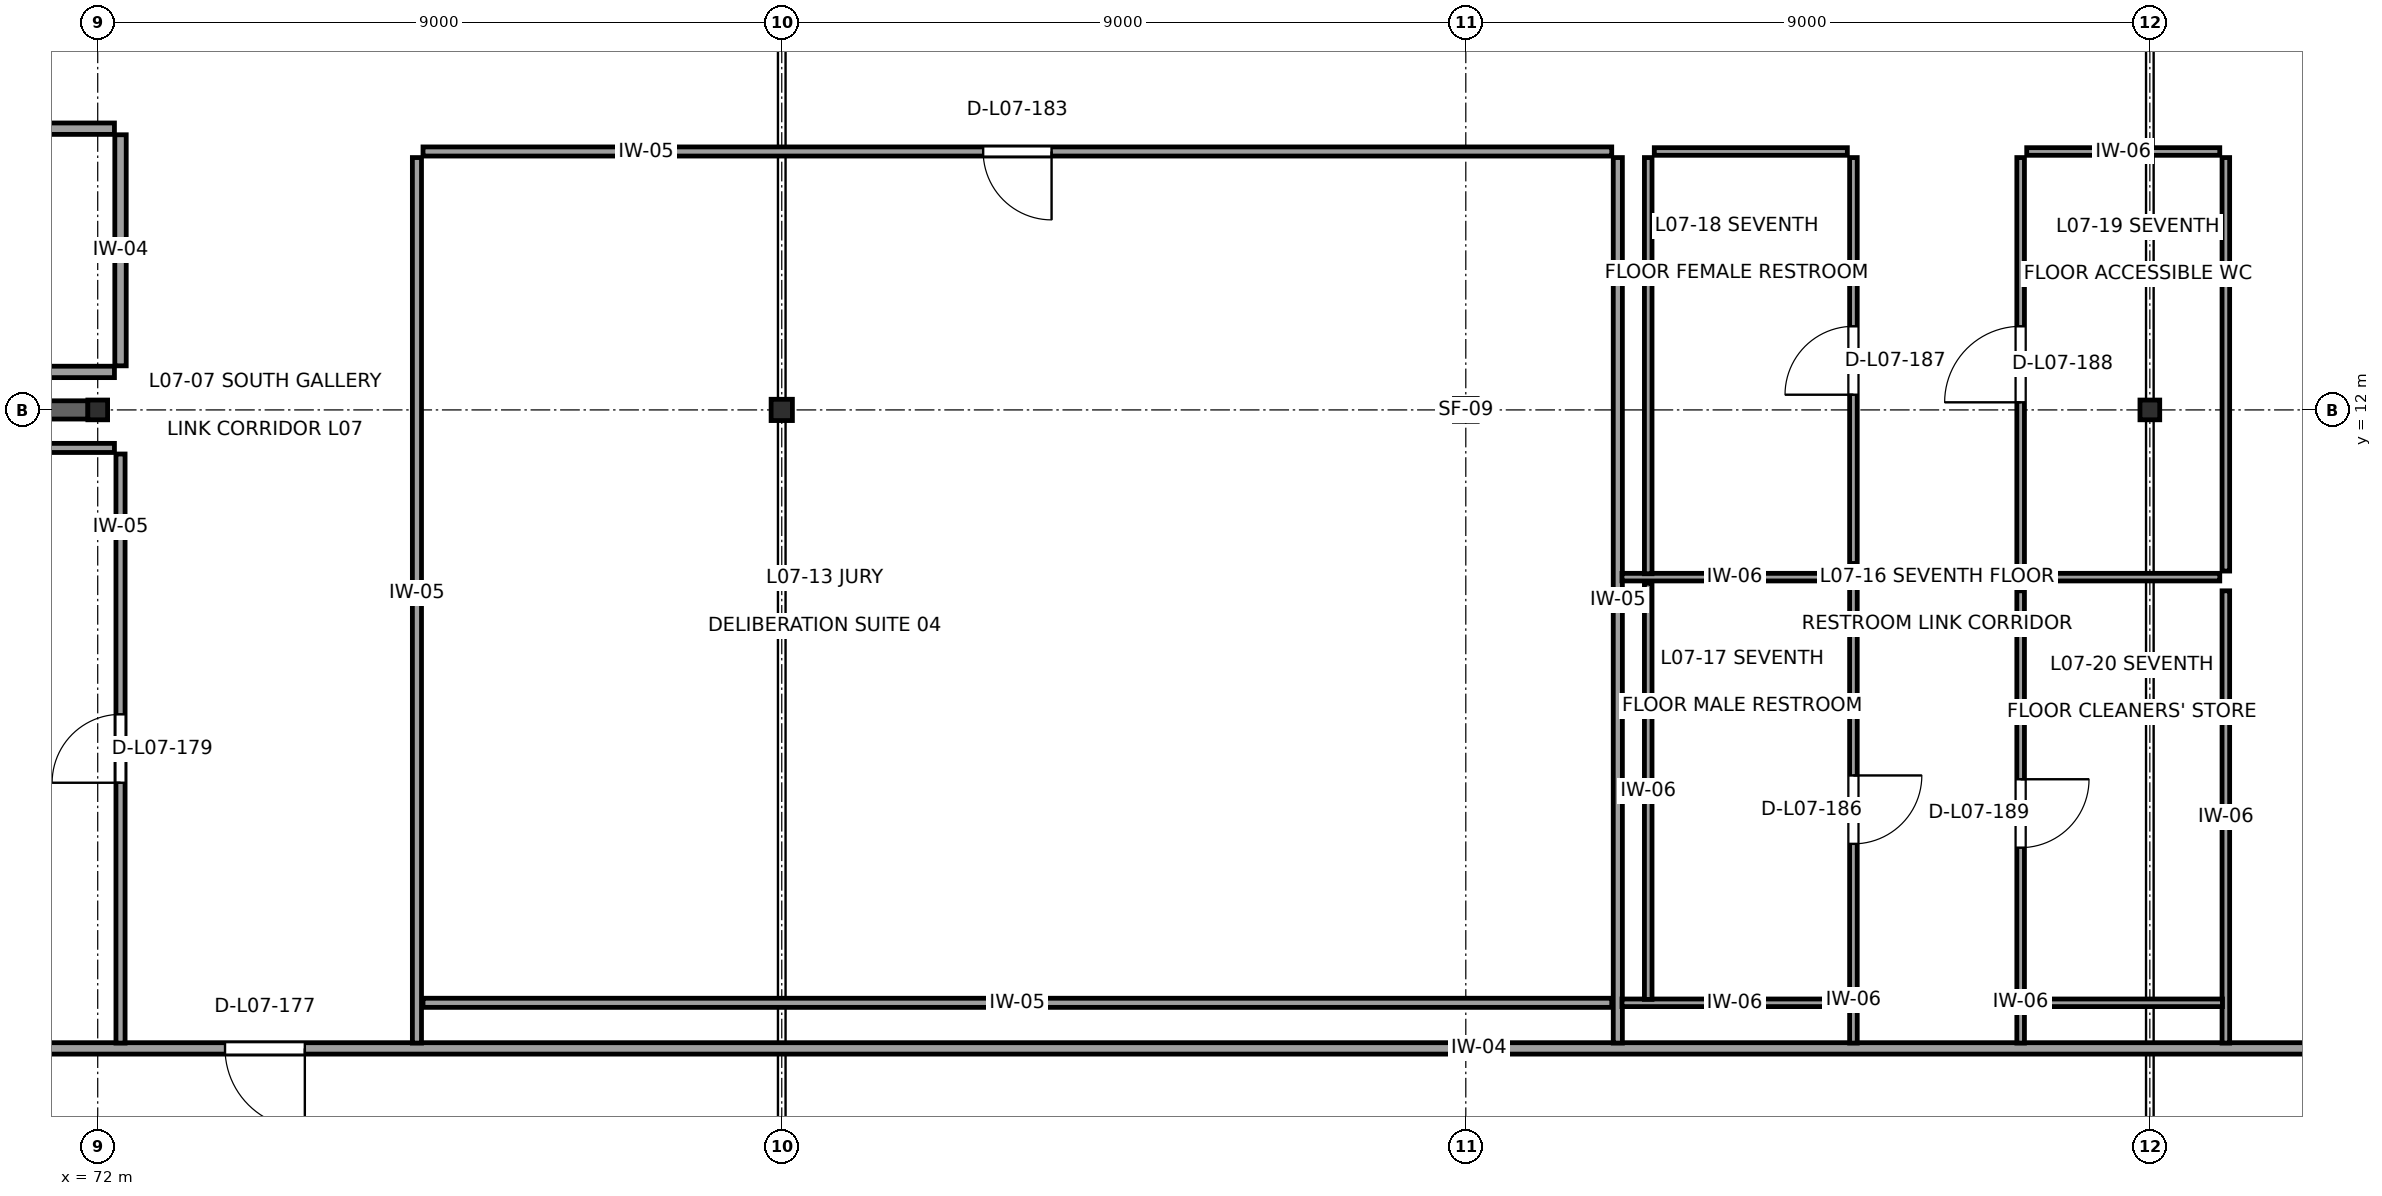
"""IFC4 building model, lengths in metres.
Left out: names, types, materials, properties, quantities, classifications, styles, units other than length and angle.
Written with IfcOpenShell. Run it as: python <this file> out.ifc"""

import sys

from ifc_helpers import new_model, si_unit, direction, frame, frame_2d, origin, origin_2d, place, context, subcontext, project, spatial, rectangle, i_section, extrude, element, fill, save


model = new_model("IFC4")
c1 = context("Model", 3, precision=1e-05, world=origin(), true_north=direction((0.0, 1.0)))
c2 = subcontext(c1, "Body", "Model", "MODEL_VIEW")
j1 = project(units=[si_unit("LENGTHUNIT", "METRE"), si_unit("PLANEANGLEUNIT", "RADIAN")], contexts=[c1])
p1 = place(None, origin())
s1 = spatial("IfcSite", under=j1, at=p1, CompositionType="ELEMENT")
p2 = place(p1, origin())
s2 = spatial("IfcBuilding", under=s1, at=p2, CompositionType="ELEMENT")
p3 = place(p2, frame((0.0, 0.0, 31.4)))
s3 = spatial("IfcBuildingStorey", under=s2, at=p3, CompositionType="ELEMENT", Elevation=31.4)
p4 = place(p3, frame((72.0, 12.0, 0.0), z_axis=(0.0, 0.0, 1.0), x_axis=(0.0, 1.0, 0.0)))
e1 = element("IfcColumn", 1, at=p4, inside=s3, PredefinedType="COLUMN", context=c2, shape_type="SweptSolid", body=[
    extrude(i_section(OverallWidth=0.26, OverallDepth=0.26, WebThickness=0.01, FlangeThickness=0.018, at=origin_2d()), origin(), (0.0, 0.0, 1.0), 4.0),
])
p5 = place(p3, frame((81.0, 12.0, 0.0), z_axis=(0.0, 0.0, 1.0), x_axis=(1.0, 0.0, 0.0)))
e2 = element("IfcColumn", 2, at=p5, inside=s3, PredefinedType="COLUMN", context=c2, shape_type="SweptSolid", body=[
    extrude(i_section(OverallWidth=0.28, OverallDepth=0.28, WebThickness=0.01, FlangeThickness=0.018, at=origin_2d()), origin(), (0.0, 0.0, 1.0), 4.0),
])
p6 = place(p3, frame((90.0, 12.0, 0.0), z_axis=(0.0, 0.0, 1.0), x_axis=(1.0, 0.0, 0.0)))
e3 = element("IfcColumn", 3, at=p6, inside=s3, PredefinedType="COLUMN", context=c2, shape_type="SweptSolid", body=[
    extrude(i_section(OverallWidth=0.3, OverallDepth=0.3, WebThickness=0.011, FlangeThickness=0.019, at=origin_2d()), origin(), (0.0, 0.0, 1.0), 4.0),
])
p7 = place(p3, frame((99.0, 12.0, 0.0), z_axis=(0.0, 0.0, 1.0), x_axis=(1.0, 0.0, 0.0)))
e4 = element("IfcColumn", 4, at=p7, inside=s3, PredefinedType="COLUMN", context=c2, shape_type="SweptSolid", body=[
    extrude(i_section(OverallWidth=0.26, OverallDepth=0.26, WebThickness=0.01, FlangeThickness=0.018, at=origin_2d()), origin(), (0.0, 0.0, 1.0), 4.0),
])
p8 = place(p3, frame((63.008, 12.0, 0.0), z_axis=(0.0, 0.0, 1.0), x_axis=(1.0, 0.0, 0.0)))
e5 = element("IfcWall", 5, at=p8, inside=s3, PredefinedType="SHEAR", context=c2, shape_type="SweptSolid", body=[
    extrude(rectangle(XDim=8.864, YDim=0.24, at=frame_2d((4.432, 0.0))), origin(), (0.0, 0.0, 1.0), 3.305),
])
p9 = place(p3, frame((45.88, 3.6, 0.0), z_axis=(0.0, 0.0, 1.0), x_axis=(1.0, 0.0, 0.0)))
e6 = element("IfcWall", 6, at=p9, inside=s3, PredefinedType="PARTITIONING", context=c2, shape_type="SweptSolid", body=[
    extrude(rectangle(XDim=58.24, YDim=0.15, at=frame_2d((29.12, 0.0))), origin(), (0.0, 0.0, 1.0), 3.64),
])
p10 = place(p9, frame((27.795, 0.0, 0.0)))
e7 = element("IfcOpeningElement", 7, at=p10, cuts=e6, PredefinedType="OPENING", context=c2, shape_type="SweptSolid", body=[
    extrude(rectangle(XDim=1.05, YDim=2.25, at=frame_2d((0.525, 1.125))), frame((0.0, 0.09, 0.0), z_axis=(0.0, -1.0, 0.0), x_axis=(1.0, 0.0, 0.0)), (0.0, 0.0, 1.0), 0.18),
])
p11 = place(p3, frame((62.795, 11.5, 0.0), z_axis=(0.0, 0.0, 1.0), x_axis=(1.0, 0.0, 0.0)))
e8 = element("IfcWall", 8, at=p11, inside=s3, PredefinedType="PARTITIONING", context=c2, shape_type="SweptSolid", body=[
    extrude(rectangle(XDim=9.425, YDim=0.12, at=frame_2d((4.712, 0.0))), origin(), (0.0, 0.0, 1.0), 3.64),
])
p12 = place(p3, frame((72.3, 11.42, 0.0), z_axis=(0.0, 0.0, 1.0), x_axis=(0.0, -1.0, 0.0)))
e9 = element("IfcWall", 9, at=p12, inside=s3, PredefinedType="PARTITIONING", context=c2, shape_type="SweptSolid", body=[
    extrude(rectangle(XDim=7.75, YDim=0.12, at=frame_2d((3.875, 0.0))), origin(), (0.0, 0.0, 1.0), 3.64),
])
p13 = place(p12, frame((3.425, 0.0, 0.0)))
e10 = element("IfcOpeningElement", 10, at=p13, cuts=e9, PredefinedType="OPENING", context=c2, shape_type="SweptSolid", body=[
    extrude(rectangle(XDim=0.9, YDim=2.1, at=frame_2d((0.45, 1.05))), frame((0.0, 0.075, 0.0), z_axis=(0.0, -1.0, 0.0), x_axis=(1.0, 0.0, 0.0)), (0.0, 0.0, 1.0), 0.15),
])
p14 = place(p3, frame((62.795, 15.7, 0.0), z_axis=(0.0, 0.0, 1.0), x_axis=(1.0, 0.0, 0.0)))
e11 = element("IfcWall", 11, at=p14, inside=s3, PredefinedType="PARTITIONING", context=c2, shape_type="SweptSolid", body=[
    extrude(rectangle(XDim=9.425, YDim=0.15, at=frame_2d((4.712, 0.0))), origin(), (0.0, 0.0, 1.0), 3.64),
])
p15 = place(p14, frame((4.187, 0.0, 0.0)))
e12 = element("IfcOpeningElement", 12, at=p15, cuts=e11, PredefinedType="OPENING", context=c2, shape_type="SweptSolid", body=[
    extrude(rectangle(XDim=1.05, YDim=2.25, at=frame_2d((0.525, 1.125))), frame((0.0, 0.09, 0.0), z_axis=(0.0, -1.0, 0.0), x_axis=(1.0, 0.0, 0.0)), (0.0, 0.0, 1.0), 0.18),
])
p16 = place(p3, frame((72.3, 15.62, 0.0), z_axis=(0.0, 0.0, 1.0), x_axis=(0.0, -1.0, 0.0)))
e13 = element("IfcWall", 13, at=p16, inside=s3, PredefinedType="PARTITIONING", context=c2, shape_type="SweptSolid", body=[
    extrude(rectangle(XDim=3.04, YDim=0.15, at=frame_2d((1.52, 0.0))), origin(), (0.0, 0.0, 1.0), 3.64),
])
p17 = place(p3, frame((72.22, 12.5, 0.0), z_axis=(0.0, 0.0, 1.0), x_axis=(-1.0, 0.0, 0.0)))
e14 = element("IfcWall", 14, at=p17, inside=s3, PredefinedType="PARTITIONING", context=c2, shape_type="SweptSolid", body=[
    extrude(rectangle(XDim=9.425, YDim=0.15, at=frame_2d((4.712, 0.0))), origin(), (0.0, 0.0, 1.0), 3.64),
])
p18 = place(p3, frame((91.92, 4.2, 0.0), z_axis=(0.0, 0.0, 1.0), x_axis=(-1.0, 0.0, 0.0)))
e15 = element("IfcWall", 15, at=p18, inside=s3, PredefinedType="PARTITIONING", context=c2, shape_type="SweptSolid", body=[
    extrude(rectangle(XDim=15.64, YDim=0.12, at=frame_2d((7.82, 0.0))), origin(), (0.0, 0.0, 1.0), 3.64),
])
p19 = place(p3, frame((76.2, 3.67, 0.0), z_axis=(0.0, 0.0, 1.0), x_axis=(0.0, 1.0, 0.0)))
e16 = element("IfcWall", 16, at=p19, inside=s3, PredefinedType="PARTITIONING", context=c2, shape_type="SweptSolid", body=[
    extrude(rectangle(XDim=11.65, YDim=0.12, at=frame_2d((5.825, 0.0))), origin(), (0.0, 0.0, 1.0), 3.64),
])
p20 = place(p3, frame((76.28, 15.4, 0.0), z_axis=(0.0, 0.0, 1.0), x_axis=(1.0, 0.0, 0.0)))
e17 = element("IfcWall", 17, at=p20, inside=s3, PredefinedType="PARTITIONING", context=c2, shape_type="SweptSolid", body=[
    extrude(rectangle(XDim=15.64, YDim=0.12, at=frame_2d((7.82, 0.0))), origin(), (0.0, 0.0, 1.0), 3.64),
])
p21 = place(p20, frame((7.37, 0.0, 0.0)))
e18 = element("IfcOpeningElement", 18, at=p21, cuts=e17, PredefinedType="OPENING", context=c2, shape_type="SweptSolid", body=[
    extrude(rectangle(XDim=0.9, YDim=2.1, at=frame_2d((0.45, 1.05))), frame((0.0, 0.075, 0.0), z_axis=(0.0, -1.0, 0.0), x_axis=(1.0, 0.0, 0.0)), (0.0, 0.0, 1.0), 0.15),
])
p22 = place(p3, frame((92.0, 15.32, 0.0), z_axis=(0.0, 0.0, 1.0), x_axis=(0.0, -1.0, 0.0)))
e19 = element("IfcWall", 19, at=p22, inside=s3, PredefinedType="PARTITIONING", context=c2, shape_type="SweptSolid", body=[
    extrude(rectangle(XDim=11.65, YDim=0.12, at=frame_2d((5.825, 0.0))), origin(), (0.0, 0.0, 1.0), 3.64),
])
p23 = place(p3, frame((95.02, 4.2, 0.0), z_axis=(0.0, 0.0, 1.0), x_axis=(-1.0, 0.0, 0.0)))
e20 = element("IfcWall", 20, at=p23, inside=s3, PredefinedType="PARTITIONING", context=c2, shape_type="SweptSolid", body=[
    extrude(rectangle(XDim=2.965, YDim=0.1, at=frame_2d((1.482, 0.0))), origin(), (0.0, 0.0, 1.0), 3.64),
])
p24 = place(p3, frame((92.4, 4.245, 0.0), z_axis=(0.0, 0.0, 1.0), x_axis=(0.0, 1.0, 0.0)))
e21 = element("IfcWall", 21, at=p24, inside=s3, PredefinedType="PARTITIONING", context=c2, shape_type="SweptSolid", body=[
    extrude(rectangle(XDim=5.475, YDim=0.1, at=frame_2d((2.737, 0.0))), origin(), (0.0, 0.0, 1.0), 3.64),
])
p25 = place(p3, frame((92.055, 9.8, 0.0), z_axis=(0.0, 0.0, 1.0), x_axis=(1.0, 0.0, 0.0)))
e22 = element("IfcWall", 22, at=p25, inside=s3, PredefinedType="PARTITIONING", context=c2, shape_type="SweptSolid", body=[
    extrude(rectangle(XDim=2.965, YDim=0.1, at=frame_2d((1.482, 0.0))), origin(), (0.0, 0.0, 1.0), 3.64),
])
p26 = place(p3, frame((95.1, 9.72, 0.0), z_axis=(0.0, 0.0, 1.0), x_axis=(0.0, -1.0, 0.0)))
e23 = element("IfcWall", 23, at=p26, inside=s3, PredefinedType="PARTITIONING", context=c2, shape_type="SweptSolid", body=[
    extrude(rectangle(XDim=6.05, YDim=0.1, at=frame_2d((3.025, 0.0))), origin(), (0.0, 0.0, 1.0), 3.64),
])
p27 = place(p26, frame((2.529, 0.0, 0.0)))
e24 = element("IfcOpeningElement", 24, at=p27, cuts=e23, PredefinedType="OPENING", context=c2, shape_type="SweptSolid", body=[
    extrude(rectangle(XDim=0.9, YDim=2.05, at=frame_2d((0.45, 1.025))), frame((0.0, 0.065, 0.0), z_axis=(0.0, -1.0, 0.0), x_axis=(1.0, 0.0, 0.0)), (0.0, 0.0, 1.0), 0.13),
])
p28 = place(p3, frame((92.48, 15.4, 0.0), z_axis=(0.0, 0.0, 1.0), x_axis=(1.0, 0.0, 0.0)))
e25 = element("IfcWall", 25, at=p28, inside=s3, PredefinedType="PARTITIONING", context=c2, shape_type="SweptSolid", body=[
    extrude(rectangle(XDim=2.54, YDim=0.1, at=frame_2d((1.27, 0.0))), origin(), (0.0, 0.0, 1.0), 3.64),
])
p29 = place(p3, frame((95.1, 15.32, 0.0), z_axis=(0.0, 0.0, 1.0), x_axis=(0.0, -1.0, 0.0)))
e26 = element("IfcWall", 26, at=p29, inside=s3, PredefinedType="PARTITIONING", context=c2, shape_type="SweptSolid", body=[
    extrude(rectangle(XDim=5.34, YDim=0.1, at=frame_2d((2.67, 0.0))), origin(), (0.0, 0.0, 1.0), 3.64),
])
p30 = place(p29, frame((2.22, 0.0, 0.0)))
e27 = element("IfcOpeningElement", 27, at=p30, cuts=e26, PredefinedType="OPENING", context=c2, shape_type="SweptSolid", body=[
    extrude(rectangle(XDim=0.9, YDim=2.05, at=frame_2d((0.45, 1.025))), frame((0.0, 0.065, 0.0), z_axis=(0.0, -1.0, 0.0), x_axis=(1.0, 0.0, 0.0)), (0.0, 0.0, 1.0), 0.13),
])
p31 = place(p3, frame((92.4, 9.845, 0.0), z_axis=(0.0, 0.0, 1.0), x_axis=(0.0, 1.0, 0.0)))
e28 = element("IfcWall", 28, at=p31, inside=s3, PredefinedType="PARTITIONING", context=c2, shape_type="SweptSolid", body=[
    extrude(rectangle(XDim=5.475, YDim=0.1, at=frame_2d((2.738, 0.0))), origin(), (0.0, 0.0, 1.0), 3.64),
])
p32 = place(p3, frame((97.38, 15.4, 0.0), z_axis=(0.0, 0.0, 1.0), x_axis=(1.0, 0.0, 0.0)))
e29 = element("IfcWall", 29, at=p32, inside=s3, PredefinedType="PARTITIONING", context=c2, shape_type="SweptSolid", body=[
    extrude(rectangle(XDim=2.54, YDim=0.1, at=frame_2d((1.27, 0.0))), origin(), (0.0, 0.0, 1.0), 3.64),
])
p33 = place(p3, frame((100.0, 15.32, 0.0), z_axis=(0.0, 0.0, 1.0), x_axis=(0.0, -1.0, 0.0)))
e30 = element("IfcWall", 30, at=p33, inside=s3, PredefinedType="PARTITIONING", context=c2, shape_type="SweptSolid", body=[
    extrude(rectangle(XDim=5.44, YDim=0.1, at=frame_2d((2.72, 0.0))), origin(), (0.0, 0.0, 1.0), 3.64),
])
p34 = place(p3, frame((99.92, 9.8, 0.0), z_axis=(0.0, 0.0, 1.0), x_axis=(-1.0, 0.0, 0.0)))
e31 = element("IfcWall", 31, at=p34, inside=s3, PredefinedType="PARTITIONING", context=c2, shape_type="SweptSolid", body=[
    extrude(rectangle(XDim=2.54, YDim=0.1, at=frame_2d((1.27, 0.0))), origin(), (0.0, 0.0, 1.0), 3.64),
])
p35 = place(p3, frame((97.3, 9.88, 0.0), z_axis=(0.0, 0.0, 1.0), x_axis=(0.0, 1.0, 0.0)))
e32 = element("IfcWall", 32, at=p35, inside=s3, PredefinedType="PARTITIONING", context=c2, shape_type="SweptSolid", body=[
    extrude(rectangle(XDim=5.44, YDim=0.1, at=frame_2d((2.72, 0.0))), origin(), (0.0, 0.0, 1.0), 3.64),
])
p36 = place(p35, frame((2.22, 0.0, 0.0)))
e33 = element("IfcOpeningElement", 33, at=p36, cuts=e32, PredefinedType="OPENING", context=c2, shape_type="SweptSolid", body=[
    extrude(rectangle(XDim=1.0, YDim=2.1, at=frame_2d((0.5, 1.05))), frame((0.0, 0.065, 0.0), z_axis=(0.0, -1.0, 0.0), x_axis=(1.0, 0.0, 0.0)), (0.0, 0.0, 1.0), 0.13),
])
p37 = place(p3, frame((100.0, 9.62, 0.0), z_axis=(0.0, 0.0, 1.0), x_axis=(0.0, -1.0, 0.0)))
e34 = element("IfcWall", 34, at=p37, inside=s3, PredefinedType="PARTITIONING", context=c2, shape_type="SweptSolid", body=[
    extrude(rectangle(XDim=5.95, YDim=0.1, at=frame_2d((2.975, 0.0))), origin(), (0.0, 0.0, 1.0), 3.64),
])
p38 = place(p3, frame((99.955, 4.2, 0.0), z_axis=(0.0, 0.0, 1.0), x_axis=(-1.0, 0.0, 0.0)))
e35 = element("IfcWall", 35, at=p38, inside=s3, PredefinedType="PARTITIONING", context=c2, shape_type="SweptSolid", body=[
    extrude(rectangle(XDim=2.575, YDim=0.1, at=frame_2d((1.288, 0.0))), origin(), (0.0, 0.0, 1.0), 3.64),
])
p39 = place(p3, frame((97.3, 3.67, 0.0), z_axis=(0.0, 0.0, 1.0), x_axis=(0.0, 1.0, 0.0)))
e36 = element("IfcWall", 36, at=p39, inside=s3, PredefinedType="PARTITIONING", context=c2, shape_type="SweptSolid", body=[
    extrude(rectangle(XDim=5.95, YDim=0.1, at=frame_2d((2.975, 0.0))), origin(), (0.0, 0.0, 1.0), 3.64),
])
p40 = place(p39, frame((2.571, 0.0, 0.0)))
e37 = element("IfcOpeningElement", 37, at=p40, cuts=e36, PredefinedType="OPENING", context=c2, shape_type="SweptSolid", body=[
    extrude(rectangle(XDim=0.9, YDim=2.05, at=frame_2d((0.45, 1.025))), frame((0.0, 0.065, 0.0), z_axis=(0.0, -1.0, 0.0), x_axis=(1.0, 0.0, 0.0)), (0.0, 0.0, 1.0), 0.13),
])
p41 = place(p10, frame((1.05, 0.0, 0.0), z_axis=(0.0, 0.0, 1.0), x_axis=(-1.0, 0.0, 0.0)))
e38 = element("IfcDoor", 38, at=p41, inside=s3, OperationType="SINGLE_SWING_RIGHT", PredefinedType="DOOR", context=c2, shape_type="SweptSolid", body=[
    extrude(rectangle(XDim=1.05, YDim=2.25, at=frame_2d((0.525, 1.125))), frame((0.0, 0.025, 0.0), z_axis=(0.0, -1.0, 0.0), x_axis=(1.0, 0.0, 0.0)), (0.0, 0.0, 1.0), 0.05),
])
fill(e7, e38)
p42 = place(p13, frame((0.9, 0.0, 0.0), z_axis=(0.0, 0.0, 1.0), x_axis=(-1.0, 0.0, 0.0)))
e39 = element("IfcDoor", 39, at=p42, inside=s3, OperationType="SINGLE_SWING_RIGHT", PredefinedType="DOOR", context=c2, shape_type="SweptSolid", body=[
    extrude(rectangle(XDim=0.9, YDim=2.1, at=frame_2d((0.45, 1.05))), frame((0.0, 0.025, 0.0), z_axis=(0.0, -1.0, 0.0), x_axis=(1.0, 0.0, 0.0)), (0.0, 0.0, 1.0), 0.05),
])
fill(e10, e39)
p43 = place(p21, frame((0.9, 0.0, 0.0), z_axis=(0.0, 0.0, 1.0), x_axis=(-1.0, 0.0, 0.0)))
e40 = element("IfcDoor", 40, at=p43, inside=s3, OperationType="SINGLE_SWING_RIGHT", PredefinedType="DOOR", context=c2, shape_type="SweptSolid", body=[
    extrude(rectangle(XDim=0.9, YDim=2.1, at=frame_2d((0.45, 1.05))), frame((0.0, 0.025, 0.0), z_axis=(0.0, -1.0, 0.0), x_axis=(1.0, 0.0, 0.0)), (0.0, 0.0, 1.0), 0.05),
])
fill(e18, e40)
p44 = place(p27, origin())
e41 = element("IfcDoor", 41, at=p44, inside=s3, OperationType="SINGLE_SWING_LEFT", PredefinedType="DOOR", context=c2, shape_type="SweptSolid", body=[
    extrude(rectangle(XDim=0.9, YDim=2.05, at=frame_2d((0.45, 1.025))), frame((0.0, 0.025, 0.0), z_axis=(0.0, -1.0, 0.0), x_axis=(1.0, 0.0, 0.0)), (0.0, 0.0, 1.0), 0.05),
])
fill(e24, e41)
p45 = place(p30, frame((0.9, 0.0, 0.0), z_axis=(0.0, 0.0, 1.0), x_axis=(-1.0, 0.0, 0.0)))
e42 = element("IfcDoor", 42, at=p45, inside=s3, OperationType="SINGLE_SWING_RIGHT", PredefinedType="DOOR", context=c2, shape_type="SweptSolid", body=[
    extrude(rectangle(XDim=0.9, YDim=2.05, at=frame_2d((0.45, 1.025))), frame((0.0, 0.025, 0.0), z_axis=(0.0, -1.0, 0.0), x_axis=(1.0, 0.0, 0.0)), (0.0, 0.0, 1.0), 0.05),
])
fill(e27, e42)
p46 = place(p36, origin())
e43 = element("IfcDoor", 43, at=p46, inside=s3, OperationType="SINGLE_SWING_LEFT", PredefinedType="DOOR", context=c2, shape_type="SweptSolid", body=[
    extrude(rectangle(XDim=1.0, YDim=2.1, at=frame_2d((0.5, 1.05))), frame((0.0, 0.025, 0.0), z_axis=(0.0, -1.0, 0.0), x_axis=(1.0, 0.0, 0.0)), (0.0, 0.0, 1.0), 0.05),
])
fill(e33, e43)
p47 = place(p40, frame((0.9, 0.0, 0.0), z_axis=(0.0, 0.0, 1.0), x_axis=(-1.0, 0.0, 0.0)))
e44 = element("IfcDoor", 44, at=p47, inside=s3, OperationType="SINGLE_SWING_RIGHT", PredefinedType="DOOR", context=c2, shape_type="SweptSolid", body=[
    extrude(rectangle(XDim=0.9, YDim=2.05, at=frame_2d((0.45, 1.025))), frame((0.0, 0.025, 0.0), z_axis=(0.0, -1.0, 0.0), x_axis=(1.0, 0.0, 0.0)), (0.0, 0.0, 1.0), 0.05),
])
fill(e37, e44)
save(model, sys.argv[1])
